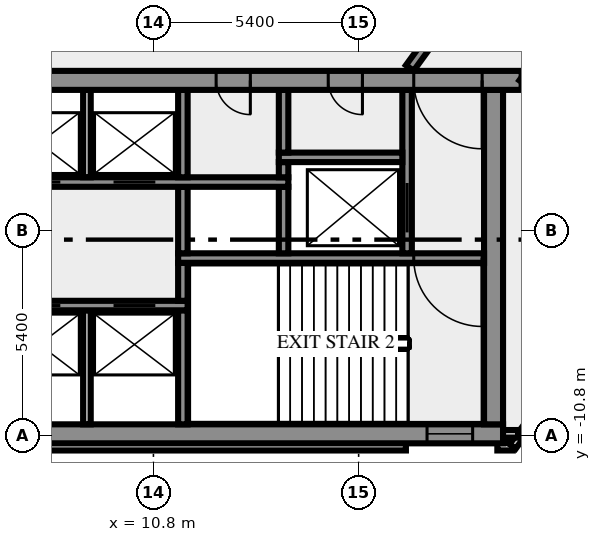
"""IFC4 building model, lengths in metres.
Left out: names, types, materials, properties, quantities, classifications, styles, units other than length and angle.
Written with IfcOpenShell. Run it as: python <this file> out.ifc"""

import sys

from ifc_helpers import new_model, si_unit, direction, frame, frame_2d, origin, place, context, subcontext, project, spatial, rectangle, extrude, element, fill, save


model = new_model("IFC4")
c1 = context("Model", 3, precision=1e-05, world=origin(), true_north=direction((0.0, 1.0)))
c2 = subcontext(c1, "Body", "Model", "MODEL_VIEW")
j1 = project(units=[si_unit("LENGTHUNIT", "METRE"), si_unit("PLANEANGLEUNIT", "RADIAN")], contexts=[c1])
p1 = place(None, origin())
s1 = spatial("IfcSite", under=j1, at=p1, CompositionType="ELEMENT")
p2 = place(p1, origin())
s2 = spatial("IfcBuilding", under=s1, at=p2, CompositionType="ELEMENT")
p3 = place(p2, frame((0.0, 0.0, 248.0)))
s3 = spatial("IfcBuildingStorey", under=s2, at=p3, CompositionType="ELEMENT", Elevation=248.0)
p4 = place(p3, frame((-17.444, -11.088, 0.0), z_axis=(0.0, 0.0, 1.0), x_axis=(1.0, 0.0, 0.0)))
e1 = element("IfcWall", 1, at=p4, inside=s3, PredefinedType="SOLIDWALL", context=c2, shape_type="SweptSolid", body=[
    extrude(rectangle(XDim=34.888, YDim=0.2, at=frame_2d((17.444, 0.0))), origin(), (0.0, 0.0, 1.0), 4.65),
])
p5 = place(p3, frame((19.85, -11.088, 0.0), z_axis=(0.0, 0.0, 1.0), x_axis=(1.0, 0.0, 0.0)))
e2 = element("IfcWall", 2, at=p5, inside=s3, PredefinedType="SOLIDWALL", context=c2, shape_type="SweptSolid", body=[
    extrude(rectangle(XDim=0.406, YDim=0.2, at=frame_2d((0.203, 0.0))), origin(), (0.0, 0.0, 1.0), 4.65),
])
p6 = place(p3, frame((20.253, -11.083, 0.0), z_axis=(0.0, 0.0, 1.0), x_axis=(0.587766567315, 0.809030569476, 0.0)))
e3 = element("IfcWall", 3, at=p6, inside=s3, PredefinedType="SOLIDWALL", context=c2, shape_type="SweptSolid", body=[
    extrude(rectangle(XDim=2.688, YDim=0.2, at=frame_2d((1.344, 0.0))), origin(), (0.0, 0.0, 1.0), 4.65),
])
p7 = place(p3, frame((19.98, -10.75, 0.0), z_axis=(0.0, 0.0, 1.0), x_axis=(1.0, 0.0, 0.0)))
e4 = element("IfcWall", 4, at=p7, inside=s3, PredefinedType="SOLIDWALL", context=c2, shape_type="SweptSolid", body=[
    extrude(rectangle(XDim=0.417, YDim=0.2, at=frame_2d((0.208, 0.0))), origin(), (0.0, 0.0, 1.0), 4.65),
])
p8 = place(p3, frame((-20.0, -10.75, 0.0), z_axis=(0.0, 0.0, 1.0), x_axis=(1.0, 0.0, 0.0)))
e5 = element("IfcWall", 5, at=p8, inside=s3, PredefinedType="SHEAR", context=c2, shape_type="SweptSolid", body=[
    extrude(rectangle(XDim=40.0, YDim=0.5, at=frame_2d((20.0, 0.0))), origin(), (0.0, 0.0, 1.0), 4.65),
])
p9 = place(p8, frame((0.8, 0.0, 1.0)))
e6 = element("IfcOpeningElement", 6, at=p9, cuts=e5, PredefinedType="OPENING", context=c2, shape_type="SweptSolid", body=[
    extrude(rectangle(XDim=1.2, YDim=1.2, at=frame_2d((0.6, 0.6))), frame((0.0, 0.26, 0.0), z_axis=(0.0, -1.0, 0.0), x_axis=(1.0, 0.0, 0.0)), (0.0, 0.0, 1.0), 0.52),
])
p10 = place(p8, frame((38.0, 0.0, 1.0)))
e7 = element("IfcOpeningElement", 7, at=p10, cuts=e5, PredefinedType="OPENING", context=c2, shape_type="SweptSolid", body=[
    extrude(rectangle(XDim=1.2, YDim=1.2, at=frame_2d((0.6, 0.6))), frame((0.0, 0.26, 0.0), z_axis=(0.0, -1.0, 0.0), x_axis=(1.0, 0.0, 0.0)), (0.0, 0.0, 1.0), 0.52),
])
p11 = place(p3, frame((9.05, -10.5, 0.0), z_axis=(0.0, 0.0, 1.0), x_axis=(0.0, 1.0, 0.0)))
e8 = element("IfcWall", 8, at=p11, inside=s3, PredefinedType="SOLIDWALL", context=c2, shape_type="SweptSolid", body=[
    extrude(rectangle(XDim=3.0, YDim=0.2, at=frame_2d((1.5, 0.0))), origin(), (0.0, 0.0, 1.0), 4.65),
])
p12 = place(p3, frame((11.575, -10.5, 0.0), z_axis=(0.0, 0.0, 1.0), x_axis=(0.0, 1.0, 0.0)))
e9 = element("IfcWall", 9, at=p12, inside=s3, PredefinedType="SHEAR", context=c2, shape_type="SweptSolid", body=[
    extrude(rectangle(XDim=3.0, YDim=0.25, at=frame_2d((1.5, 0.0))), origin(), (0.0, 0.0, 1.0), 4.65),
])
p13 = place(p3, frame((19.75, -10.5, 0.0), z_axis=(0.0, 0.0, 1.0), x_axis=(0.0, 1.0, 0.0)))
e10 = element("IfcWall", 10, at=p13, inside=s3, PredefinedType="SHEAR", context=c2, shape_type="SweptSolid", body=[
    extrude(rectangle(XDim=8.8, YDim=0.5, at=frame_2d((4.4, 0.0))), origin(), (0.0, 0.0, 1.0), 4.65),
])
p14 = place(p3, frame((11.7, -7.375, 0.0), z_axis=(0.0, 0.0, 1.0), x_axis=(-1.0, 0.0, 0.0)))
e11 = element("IfcWall", 11, at=p14, inside=s3, PredefinedType="SHEAR", context=c2, shape_type="SweptSolid", body=[
    extrude(rectangle(XDim=23.4, YDim=0.25, at=frame_2d((11.7, 0.0))), origin(), (0.0, 0.0, 1.0), 4.65),
])
p15 = place(p14, frame((22.225, 0.0, 0.0)))
e12 = element("IfcOpeningElement", 12, at=p15, cuts=e11, PredefinedType="OPENING", context=c2, shape_type="SweptSolid", body=[
    extrude(rectangle(XDim=0.8, YDim=2.1, at=frame_2d((0.4, 1.05))), frame((0.0, 0.135, 0.0), z_axis=(0.0, -1.0, 0.0), x_axis=(1.0, 0.0, 0.0)), (0.0, 0.0, 1.0), 0.27),
])
p16 = place(p14, frame((20.2, 0.0, 0.0)))
e13 = element("IfcOpeningElement", 13, at=p16, cuts=e11, PredefinedType="OPENING", context=c2, shape_type="SweptSolid", body=[
    extrude(rectangle(XDim=1.1, YDim=2.1, at=frame_2d((0.55, 1.05))), frame((0.0, 0.135, 0.0), z_axis=(0.0, -1.0, 0.0), x_axis=(1.0, 0.0, 0.0)), (0.0, 0.0, 1.0), 0.27),
])
p17 = place(p14, frame((17.7, 0.0, 0.0)))
e14 = element("IfcOpeningElement", 14, at=p17, cuts=e11, PredefinedType="OPENING", context=c2, shape_type="SweptSolid", body=[
    extrude(rectangle(XDim=1.1, YDim=2.1, at=frame_2d((0.55, 1.05))), frame((0.0, 0.135, 0.0), z_axis=(0.0, -1.0, 0.0), x_axis=(1.0, 0.0, 0.0)), (0.0, 0.0, 1.0), 0.27),
])
p18 = place(p14, frame((15.975, 0.0, 0.0)))
e15 = element("IfcOpeningElement", 15, at=p18, cuts=e11, PredefinedType="OPENING", context=c2, shape_type="SweptSolid", body=[
    extrude(rectangle(XDim=0.8, YDim=2.1, at=frame_2d((0.4, 1.05))), frame((0.0, 0.135, 0.0), z_axis=(0.0, -1.0, 0.0), x_axis=(1.0, 0.0, 0.0)), (0.0, 0.0, 1.0), 0.27),
])
p19 = place(p14, frame((14.75, 0.0, 0.0)))
e16 = element("IfcOpeningElement", 16, at=p19, cuts=e11, PredefinedType="OPENING", context=c2, shape_type="SweptSolid", body=[
    extrude(rectangle(XDim=0.7, YDim=2.1, at=frame_2d((0.35, 1.05))), frame((0.0, 0.135, 0.0), z_axis=(0.0, -1.0, 0.0), x_axis=(1.0, 0.0, 0.0)), (0.0, 0.0, 1.0), 0.27),
])
p20 = place(p14, frame((13.35, 0.0, 0.0)))
e17 = element("IfcOpeningElement", 17, at=p20, cuts=e11, PredefinedType="OPENING", context=c2, shape_type="SweptSolid", body=[
    extrude(rectangle(XDim=0.9, YDim=2.1, at=frame_2d((0.45, 1.05))), frame((0.0, 0.135, 0.0), z_axis=(0.0, -1.0, 0.0), x_axis=(1.0, 0.0, 0.0)), (0.0, 0.0, 1.0), 0.27),
])
p21 = place(p14, frame((11.975, 0.0, 0.0)))
e18 = element("IfcOpeningElement", 18, at=p21, cuts=e11, PredefinedType="OPENING", context=c2, shape_type="SweptSolid", body=[
    extrude(rectangle(XDim=0.9, YDim=2.1, at=frame_2d((0.45, 1.05))), frame((0.0, 0.135, 0.0), z_axis=(0.0, -1.0, 0.0), x_axis=(1.0, 0.0, 0.0)), (0.0, 0.0, 1.0), 0.27),
])
p22 = place(p14, frame((10.5, 0.0, 0.0)))
e19 = element("IfcOpeningElement", 19, at=p22, cuts=e11, PredefinedType="OPENING", context=c2, shape_type="SweptSolid", body=[
    extrude(rectangle(XDim=0.9, YDim=2.1, at=frame_2d((0.45, 1.05))), frame((0.0, 0.135, 0.0), z_axis=(0.0, -1.0, 0.0), x_axis=(1.0, 0.0, 0.0)), (0.0, 0.0, 1.0), 0.27),
])
p23 = place(p14, frame((8.35, 0.0, 0.0)))
e20 = element("IfcOpeningElement", 20, at=p23, cuts=e11, PredefinedType="OPENING", context=c2, shape_type="SweptSolid", body=[
    extrude(rectangle(XDim=1.1, YDim=2.1, at=frame_2d((0.55, 1.05))), frame((0.0, 0.135, 0.0), z_axis=(0.0, -1.0, 0.0), x_axis=(1.0, 0.0, 0.0)), (0.0, 0.0, 1.0), 0.27),
])
p24 = place(p14, frame((5.85, 0.0, 0.0)))
e21 = element("IfcOpeningElement", 21, at=p24, cuts=e11, PredefinedType="OPENING", context=c2, shape_type="SweptSolid", body=[
    extrude(rectangle(XDim=1.1, YDim=2.1, at=frame_2d((0.55, 1.05))), frame((0.0, 0.135, 0.0), z_axis=(0.0, -1.0, 0.0), x_axis=(1.0, 0.0, 0.0)), (0.0, 0.0, 1.0), 0.27),
])
p25 = place(p14, frame((3.35, 0.0, 0.0)))
e22 = element("IfcOpeningElement", 22, at=p25, cuts=e11, PredefinedType="OPENING", context=c2, shape_type="SweptSolid", body=[
    extrude(rectangle(XDim=1.1, YDim=2.1, at=frame_2d((0.55, 1.05))), frame((0.0, 0.135, 0.0), z_axis=(0.0, -1.0, 0.0), x_axis=(1.0, 0.0, 0.0)), (0.0, 0.0, 1.0), 0.27),
])
p26 = place(p14, frame((0.85, 0.0, 0.0)))
e23 = element("IfcOpeningElement", 23, at=p26, cuts=e11, PredefinedType="OPENING", context=c2, shape_type="SweptSolid", body=[
    extrude(rectangle(XDim=1.1, YDim=2.1, at=frame_2d((0.55, 1.05))), frame((0.0, 0.135, 0.0), z_axis=(0.0, -1.0, 0.0), x_axis=(1.0, 0.0, 0.0)), (0.0, 0.0, 1.0), 0.27),
])
p27 = place(p3, frame((11.575, -7.25, 0.0), z_axis=(0.0, 0.0, 1.0), x_axis=(0.0, 1.0, 0.0)))
e24 = element("IfcWall", 24, at=p27, inside=s3, PredefinedType="SHEAR", context=c2, shape_type="SweptSolid", body=[
    extrude(rectangle(XDim=1.0, YDim=0.25, at=frame_2d((0.5, 0.0))), origin(), (0.0, 0.0, 1.0), 4.65),
])
p28 = place(p3, frame((19.5, -6.125, 0.0), z_axis=(0.0, 0.0, 1.0), x_axis=(-1.0, 0.0, 0.0)))
e25 = element("IfcWall", 25, at=p28, inside=s3, PredefinedType="SHEAR", context=c2, shape_type="SweptSolid", body=[
    extrude(rectangle(XDim=8.05, YDim=0.25, at=frame_2d((4.025, 0.0))), origin(), (0.0, 0.0, 1.0), 4.65),
])
p29 = place(p28, frame((0.05, 0.0, 0.0)))
e26 = element("IfcOpeningElement", 26, at=p29, cuts=e25, PredefinedType="OPENING", context=c2, shape_type="SweptSolid", body=[
    extrude(rectangle(XDim=1.8, YDim=2.1, at=frame_2d((0.9, 1.05))), frame((0.0, 0.135, 0.0), z_axis=(0.0, -1.0, 0.0), x_axis=(1.0, 0.0, 0.0)), (0.0, 0.0, 1.0), 0.27),
])
for number, where, z_axis, x_axis in (
    (27, (11.575, -6.0, 0.0), (0.0, 0.0, 1.0), (0.0, 1.0, 0.0)),
    (28, (14.225, -6.0, 0.0), (0.0, 0.0, 1.0), (0.0, 1.0, 0.0)),
):
    element("IfcWall", number, at=place(p3, frame(where, z_axis=z_axis, x_axis=x_axis)), inside=s3, PredefinedType="SHEAR", context=c2, shape_type="SweptSolid", body=[
        extrude(rectangle(XDim=1.75, YDim=0.25, at=frame_2d((0.875, 0.0))), origin(), (0.0, 0.0, 1.0), 4.65),
    ])
p30 = place(p3, frame((17.475, -6.0, 0.0), z_axis=(0.0, 0.0, 1.0), x_axis=(0.0, 1.0, 0.0)))
e29 = element("IfcWall", 29, at=p30, inside=s3, PredefinedType="SHEAR", context=c2, shape_type="SweptSolid", body=[
    extrude(rectangle(XDim=4.3, YDim=0.25, at=frame_2d((2.15, 0.0))), origin(), (0.0, 0.0, 1.0), 4.65),
])
p31 = place(p30, frame((0.55, 0.0, 0.0)))
e30 = element("IfcOpeningElement", 30, at=p31, cuts=e29, PredefinedType="OPENING", context=c2, shape_type="SweptSolid", body=[
    extrude(rectangle(XDim=1.3, YDim=2.1, at=frame_2d((0.65, 1.05))), frame((0.0, 0.135, 0.0), z_axis=(0.0, -1.0, 0.0), x_axis=(1.0, 0.0, 0.0)), (0.0, 0.0, 1.0), 0.27),
])
p32 = place(p3, frame((1.45, -4.125, 0.0), z_axis=(0.0, 0.0, 1.0), x_axis=(1.0, 0.0, 0.0)))
e31 = element("IfcWall", 31, at=p32, inside=s3, PredefinedType="SHEAR", context=c2, shape_type="SweptSolid", body=[
    extrude(rectangle(XDim=12.9, YDim=0.25, at=frame_2d((6.45, 0.0))), origin(), (0.0, 0.0, 1.0), 4.65),
])
p33 = place(p32, frame((0.7, 0.0, 0.0)))
e32 = element("IfcOpeningElement", 32, at=p33, cuts=e31, PredefinedType="OPENING", context=c2, shape_type="SweptSolid", body=[
    extrude(rectangle(XDim=1.3, YDim=2.1, at=frame_2d((0.65, 1.05))), frame((0.0, 0.135, 0.0), z_axis=(0.0, -1.0, 0.0), x_axis=(1.0, 0.0, 0.0)), (0.0, 0.0, 1.0), 0.27),
])
p34 = place(p32, frame((3.3, 0.0, 0.0)))
e33 = element("IfcOpeningElement", 33, at=p34, cuts=e31, PredefinedType="OPENING", context=c2, shape_type="SweptSolid", body=[
    extrude(rectangle(XDim=1.1, YDim=2.1, at=frame_2d((0.55, 1.05))), frame((0.0, 0.135, 0.0), z_axis=(0.0, -1.0, 0.0), x_axis=(1.0, 0.0, 0.0)), (0.0, 0.0, 1.0), 0.27),
])
p35 = place(p32, frame((5.8, 0.0, 0.0)))
e34 = element("IfcOpeningElement", 34, at=p35, cuts=e31, PredefinedType="OPENING", context=c2, shape_type="SweptSolid", body=[
    extrude(rectangle(XDim=1.1, YDim=2.1, at=frame_2d((0.55, 1.05))), frame((0.0, 0.135, 0.0), z_axis=(0.0, -1.0, 0.0), x_axis=(1.0, 0.0, 0.0)), (0.0, 0.0, 1.0), 0.27),
])
p36 = place(p32, frame((8.3, 0.0, 0.0)))
e35 = element("IfcOpeningElement", 35, at=p36, cuts=e31, PredefinedType="OPENING", context=c2, shape_type="SweptSolid", body=[
    extrude(rectangle(XDim=1.1, YDim=2.1, at=frame_2d((0.55, 1.05))), frame((0.0, 0.135, 0.0), z_axis=(0.0, -1.0, 0.0), x_axis=(1.0, 0.0, 0.0)), (0.0, 0.0, 1.0), 0.27),
])
p37 = place(p3, frame((9.05, -4.0, 0.0), z_axis=(0.0, 0.0, 1.0), x_axis=(0.0, 1.0, 0.0)))
e36 = element("IfcWall", 36, at=p37, inside=s3, PredefinedType="SOLIDWALL", context=c2, shape_type="SweptSolid", body=[
    extrude(rectangle(XDim=2.3, YDim=0.2, at=frame_2d((1.15, 0.0))), origin(), (0.0, 0.0, 1.0), 4.65),
])
p38 = place(p3, frame((11.575, -4.0, 0.0), z_axis=(0.0, 0.0, 1.0), x_axis=(0.0, 1.0, 0.0)))
e37 = element("IfcWall", 37, at=p38, inside=s3, PredefinedType="SHEAR", context=c2, shape_type="SweptSolid", body=[
    extrude(rectangle(XDim=2.3, YDim=0.25, at=frame_2d((1.15, 0.0))), origin(), (0.0, 0.0, 1.0), 4.65),
])
p39 = place(p3, frame((14.225, -4.0, 0.0), z_axis=(0.0, 0.0, 1.0), x_axis=(0.0, 1.0, 0.0)))
e38 = element("IfcWall", 38, at=p39, inside=s3, PredefinedType="SHEAR", context=c2, shape_type="SweptSolid", body=[
    extrude(rectangle(XDim=0.4, YDim=0.25, at=frame_2d((0.2, 0.0))), origin(), (0.0, 0.0, 1.0), 4.65),
])
p40 = place(p3, frame((14.1, -3.475, 0.0), z_axis=(0.0, 0.0, 1.0), x_axis=(1.0, 0.0, 0.0)))
e39 = element("IfcWall", 39, at=p40, inside=s3, PredefinedType="SHEAR", context=c2, shape_type="SweptSolid", body=[
    extrude(rectangle(XDim=3.25, YDim=0.25, at=frame_2d((1.625, 0.0))), origin(), (0.0, 0.0, 1.0), 4.65),
])
p41 = place(p3, frame((14.225, -3.35, 0.0), z_axis=(0.0, 0.0, 1.0), x_axis=(0.0, 1.0, 0.0)))
e40 = element("IfcWall", 40, at=p41, inside=s3, PredefinedType="SHEAR", context=c2, shape_type="SweptSolid", body=[
    extrude(rectangle(XDim=1.65, YDim=0.25, at=frame_2d((0.825, 0.0))), origin(), (0.0, 0.0, 1.0), 4.65),
])
p42 = place(p3, frame((20.49, -1.45, 0.0), z_axis=(0.0, 0.0, 1.0), x_axis=(-1.0, 0.0, 0.0)))
e41 = element("IfcWall", 41, at=p42, inside=s3, PredefinedType="SHEAR", context=c2, shape_type="SweptSolid", body=[
    extrude(rectangle(XDim=40.98, YDim=0.5, at=frame_2d((20.49, 0.0))), origin(), (0.0, 0.0, 1.0), 4.65),
])
p43 = place(p42, frame((38.14, 0.0, 0.0)))
e42 = element("IfcOpeningElement", 42, at=p43, cuts=e41, PredefinedType="OPENING", context=c2, shape_type="SweptSolid", body=[
    extrude(rectangle(XDim=1.8, YDim=2.1, at=frame_2d((0.9, 1.05))), frame((0.0, 0.26, 0.0), z_axis=(0.0, -1.0, 0.0), x_axis=(1.0, 0.0, 0.0)), (0.0, 0.0, 1.0), 0.52),
])
p44 = place(p42, frame((36.728, 0.0, 0.0)))
e43 = element("IfcOpeningElement", 43, at=p44, cuts=e41, PredefinedType="OPENING", context=c2, shape_type="SweptSolid", body=[
    extrude(rectangle(XDim=0.8, YDim=2.1, at=frame_2d((0.4, 1.05))), frame((0.0, 0.26, 0.0), z_axis=(0.0, -1.0, 0.0), x_axis=(1.0, 0.0, 0.0)), (0.0, 0.0, 1.0), 0.52),
])
p45 = place(p42, frame((35.153, 0.0, 0.0)))
e44 = element("IfcOpeningElement", 44, at=p45, cuts=e41, PredefinedType="OPENING", context=c2, shape_type="SweptSolid", body=[
    extrude(rectangle(XDim=0.8, YDim=2.1, at=frame_2d((0.4, 1.05))), frame((0.0, 0.26, 0.0), z_axis=(0.0, -1.0, 0.0), x_axis=(1.0, 0.0, 0.0)), (0.0, 0.0, 1.0), 0.52),
])
p46 = place(p42, frame((32.94, 0.0, 0.0)))
e45 = element("IfcOpeningElement", 45, at=p46, cuts=e41, PredefinedType="OPENING", context=c2, shape_type="SweptSolid", body=[
    extrude(rectangle(XDim=0.9, YDim=2.1, at=frame_2d((0.45, 1.05))), frame((0.0, 0.26, 0.0), z_axis=(0.0, -1.0, 0.0), x_axis=(1.0, 0.0, 0.0)), (0.0, 0.0, 1.0), 0.52),
])
p47 = place(p42, frame((31.015, 0.0, 0.0)))
e46 = element("IfcOpeningElement", 46, at=p47, cuts=e41, PredefinedType="OPENING", context=c2, shape_type="SweptSolid", body=[
    extrude(rectangle(XDim=0.8, YDim=2.1, at=frame_2d((0.4, 1.05))), frame((0.0, 0.26, 0.0), z_axis=(0.0, -1.0, 0.0), x_axis=(1.0, 0.0, 0.0)), (0.0, 0.0, 1.0), 0.52),
])
p48 = place(p42, frame((24.765, 0.0, 0.0)))
e47 = element("IfcOpeningElement", 47, at=p48, cuts=e41, PredefinedType="OPENING", context=c2, shape_type="SweptSolid", body=[
    extrude(rectangle(XDim=0.8, YDim=2.1, at=frame_2d((0.4, 1.05))), frame((0.0, 0.26, 0.0), z_axis=(0.0, -1.0, 0.0), x_axis=(1.0, 0.0, 0.0)), (0.0, 0.0, 1.0), 0.52),
])
p49 = place(p42, frame((19.59, 0.0, 0.0)))
e48 = element("IfcOpeningElement", 48, at=p49, cuts=e41, PredefinedType="OPENING", context=c2, shape_type="SweptSolid", body=[
    extrude(rectangle(XDim=2.0, YDim=2.1, at=frame_2d((1.0, 1.05))), frame((0.0, 0.26, 0.0), z_axis=(0.0, -1.0, 0.0), x_axis=(1.0, 0.0, 0.0)), (0.0, 0.0, 1.0), 0.52),
])
p50 = place(p42, frame((7.14, 0.0, 0.0)))
e49 = element("IfcOpeningElement", 49, at=p50, cuts=e41, PredefinedType="OPENING", context=c2, shape_type="SweptSolid", body=[
    extrude(rectangle(XDim=0.9, YDim=2.1, at=frame_2d((0.45, 1.05))), frame((0.0, 0.26, 0.0), z_axis=(0.0, -1.0, 0.0), x_axis=(1.0, 0.0, 0.0)), (0.0, 0.0, 1.0), 0.52),
])
p51 = place(p42, frame((4.19, 0.0, 0.0)))
e50 = element("IfcOpeningElement", 50, at=p51, cuts=e41, PredefinedType="OPENING", context=c2, shape_type="SweptSolid", body=[
    extrude(rectangle(XDim=0.9, YDim=2.1, at=frame_2d((0.45, 1.05))), frame((0.0, 0.26, 0.0), z_axis=(0.0, -1.0, 0.0), x_axis=(1.0, 0.0, 0.0)), (0.0, 0.0, 1.0), 0.52),
])
p52 = place(p42, frame((1.04, 0.0, 0.0)))
e51 = element("IfcOpeningElement", 51, at=p52, cuts=e41, PredefinedType="OPENING", context=c2, shape_type="SweptSolid", body=[
    extrude(rectangle(XDim=1.8, YDim=2.1, at=frame_2d((0.9, 1.05))), frame((0.0, 0.26, 0.0), z_axis=(0.0, -1.0, 0.0), x_axis=(1.0, 0.0, 0.0)), (0.0, 0.0, 1.0), 0.52),
])
p53 = place(p3, frame((17.545, -1.125, 0.0), z_axis=(0.0, 0.0, 1.0), x_axis=(0.587787966774, 0.809015022181, 0.0)))
e52 = element("IfcWall", 52, at=p53, inside=s3, PredefinedType="SOLIDWALL", context=c2, shape_type="SweptSolid", body=[
    extrude(rectangle(XDim=23.345, YDim=0.25, at=frame_2d((11.672, 0.0))), origin(), (0.0, 0.0, 1.0), 4.65),
])
p54 = place(p53, frame((3.441, 0.0, 0.0)))
e53 = element("IfcOpeningElement", 53, at=p54, cuts=e52, PredefinedType="OPENING", context=c2, shape_type="SweptSolid", body=[
    extrude(rectangle(XDim=0.9, YDim=2.1, at=frame_2d((0.45, 1.05))), frame((0.0, 0.135, 0.0), z_axis=(0.0, -1.0, 0.0), x_axis=(1.0, 0.0, 0.0)), (0.0, 0.0, 1.0), 0.27),
])
p55 = place(p3, frame((33.41, 16.203, 0.0), z_axis=(0.0, 0.0, 1.0), x_axis=(-0.587786711753, -0.809015934013, 0.0)))
e54 = element("IfcWall", 54, at=p55, inside=s3, PredefinedType="SOLIDWALL", context=c2, shape_type="SweptSolid", body=[
    extrude(rectangle(XDim=21.911, YDim=0.25, at=frame_2d((10.956, 0.0))), origin(), (0.0, 0.0, 1.0), 4.65),
])
p56 = place(p55, frame((0.441, 0.0, 0.0)))
e55 = element("IfcOpeningElement", 55, at=p56, cuts=e54, PredefinedType="OPENING", context=c2, shape_type="SweptSolid", body=[
    extrude(rectangle(XDim=0.9, YDim=2.1, at=frame_2d((0.45, 1.05))), frame((0.0, 0.135, 0.0), z_axis=(0.0, -1.0, 0.0), x_axis=(1.0, 0.0, 0.0)), (0.0, 0.0, 1.0), 0.27),
])
p57 = place(p10, origin())
e56 = element("IfcWindow", 56, at=p57, inside=s3, PartitioningType="SINGLE_PANEL", PredefinedType="WINDOW", context=c2, shape_type="SweptSolid", body=[
    extrude(rectangle(XDim=1.2, YDim=1.2, at=frame_2d((0.6, 0.6))), frame((0.0, 0.03, 0.0), z_axis=(0.0, -1.0, 0.0), x_axis=(1.0, 0.0, 0.0)), (0.0, 0.0, 1.0), 0.06),
])
fill(e7, e56)
p58 = place(p25, origin())
e57 = element("IfcDoor", 57, at=p58, inside=s3, OperationType="DOUBLE_DOOR_SLIDING", PredefinedType="DOOR", context=c2, shape_type="SweptSolid", body=[
    extrude(rectangle(XDim=1.1, YDim=2.1, at=frame_2d((0.55, 1.05))), frame((0.0, 0.025, 0.0), z_axis=(0.0, -1.0, 0.0), x_axis=(1.0, 0.0, 0.0)), (0.0, 0.0, 1.0), 0.05),
])
fill(e22, e57)
p59 = place(p26, origin())
e58 = element("IfcDoor", 58, at=p59, inside=s3, OperationType="DOUBLE_DOOR_SLIDING", PredefinedType="DOOR", context=c2, shape_type="SweptSolid", body=[
    extrude(rectangle(XDim=1.1, YDim=2.1, at=frame_2d((0.55, 1.05))), frame((0.0, 0.025, 0.0), z_axis=(0.0, -1.0, 0.0), x_axis=(1.0, 0.0, 0.0)), (0.0, 0.0, 1.0), 0.05),
])
fill(e23, e58)
p60 = place(p29, origin())
e59 = element("IfcDoor", 59, at=p60, inside=s3, OperationType="DOUBLE_DOOR_SINGLE_SWING", PredefinedType="DOOR", context=c2, shape_type="SweptSolid", body=[
    extrude(rectangle(XDim=1.8, YDim=2.1, at=frame_2d((0.9, 1.05))), frame((0.0, 0.025, 0.0), z_axis=(0.0, -1.0, 0.0), x_axis=(1.0, 0.0, 0.0)), (0.0, 0.0, 1.0), 0.05),
])
fill(e26, e59)
p61 = place(p31, origin())
e60 = element("IfcDoor", 60, at=p61, inside=s3, OperationType="DOUBLE_DOOR_SLIDING", PredefinedType="DOOR", context=c2, shape_type="SweptSolid", body=[
    extrude(rectangle(XDim=1.3, YDim=2.1, at=frame_2d((0.65, 1.05))), frame((0.0, 0.025, 0.0), z_axis=(0.0, -1.0, 0.0), x_axis=(1.0, 0.0, 0.0)), (0.0, 0.0, 1.0), 0.05),
])
fill(e30, e60)
p62 = place(p35, origin())
e61 = element("IfcDoor", 61, at=p62, inside=s3, OperationType="DOUBLE_DOOR_SLIDING", PredefinedType="DOOR", context=c2, shape_type="SweptSolid", body=[
    extrude(rectangle(XDim=1.1, YDim=2.1, at=frame_2d((0.55, 1.05))), frame((0.0, 0.025, 0.0), z_axis=(0.0, -1.0, 0.0), x_axis=(1.0, 0.0, 0.0)), (0.0, 0.0, 1.0), 0.05),
])
fill(e34, e61)
p63 = place(p36, origin())
e62 = element("IfcDoor", 62, at=p63, inside=s3, OperationType="DOUBLE_DOOR_SLIDING", PredefinedType="DOOR", context=c2, shape_type="SweptSolid", body=[
    extrude(rectangle(XDim=1.1, YDim=2.1, at=frame_2d((0.55, 1.05))), frame((0.0, 0.025, 0.0), z_axis=(0.0, -1.0, 0.0), x_axis=(1.0, 0.0, 0.0)), (0.0, 0.0, 1.0), 0.05),
])
fill(e35, e62)
p64 = place(p50, origin())
e63 = element("IfcDoor", 63, at=p64, inside=s3, OperationType="SINGLE_SWING_LEFT", PredefinedType="DOOR", context=c2, shape_type="SweptSolid", body=[
    extrude(rectangle(XDim=0.9, YDim=2.1, at=frame_2d((0.45, 1.05))), frame((0.0, 0.025, 0.0), z_axis=(0.0, -1.0, 0.0), x_axis=(1.0, 0.0, 0.0)), (0.0, 0.0, 1.0), 0.05),
])
fill(e49, e63)
p65 = place(p51, origin())
e64 = element("IfcDoor", 64, at=p65, inside=s3, OperationType="SINGLE_SWING_LEFT", PredefinedType="DOOR", context=c2, shape_type="SweptSolid", body=[
    extrude(rectangle(XDim=0.9, YDim=2.1, at=frame_2d((0.45, 1.05))), frame((0.0, 0.025, 0.0), z_axis=(0.0, -1.0, 0.0), x_axis=(1.0, 0.0, 0.0)), (0.0, 0.0, 1.0), 0.05),
])
fill(e50, e64)
p66 = place(p52, origin())
e65 = element("IfcDoor", 65, at=p66, inside=s3, OperationType="DOUBLE_DOOR_SINGLE_SWING", PredefinedType="DOOR", context=c2, shape_type="SweptSolid", body=[
    extrude(rectangle(XDim=1.8, YDim=2.1, at=frame_2d((0.9, 1.05))), frame((0.0, 0.025, 0.0), z_axis=(0.0, -1.0, 0.0), x_axis=(1.0, 0.0, 0.0)), (0.0, 0.0, 1.0), 0.05),
])
fill(e51, e65)
save(model, sys.argv[1])
